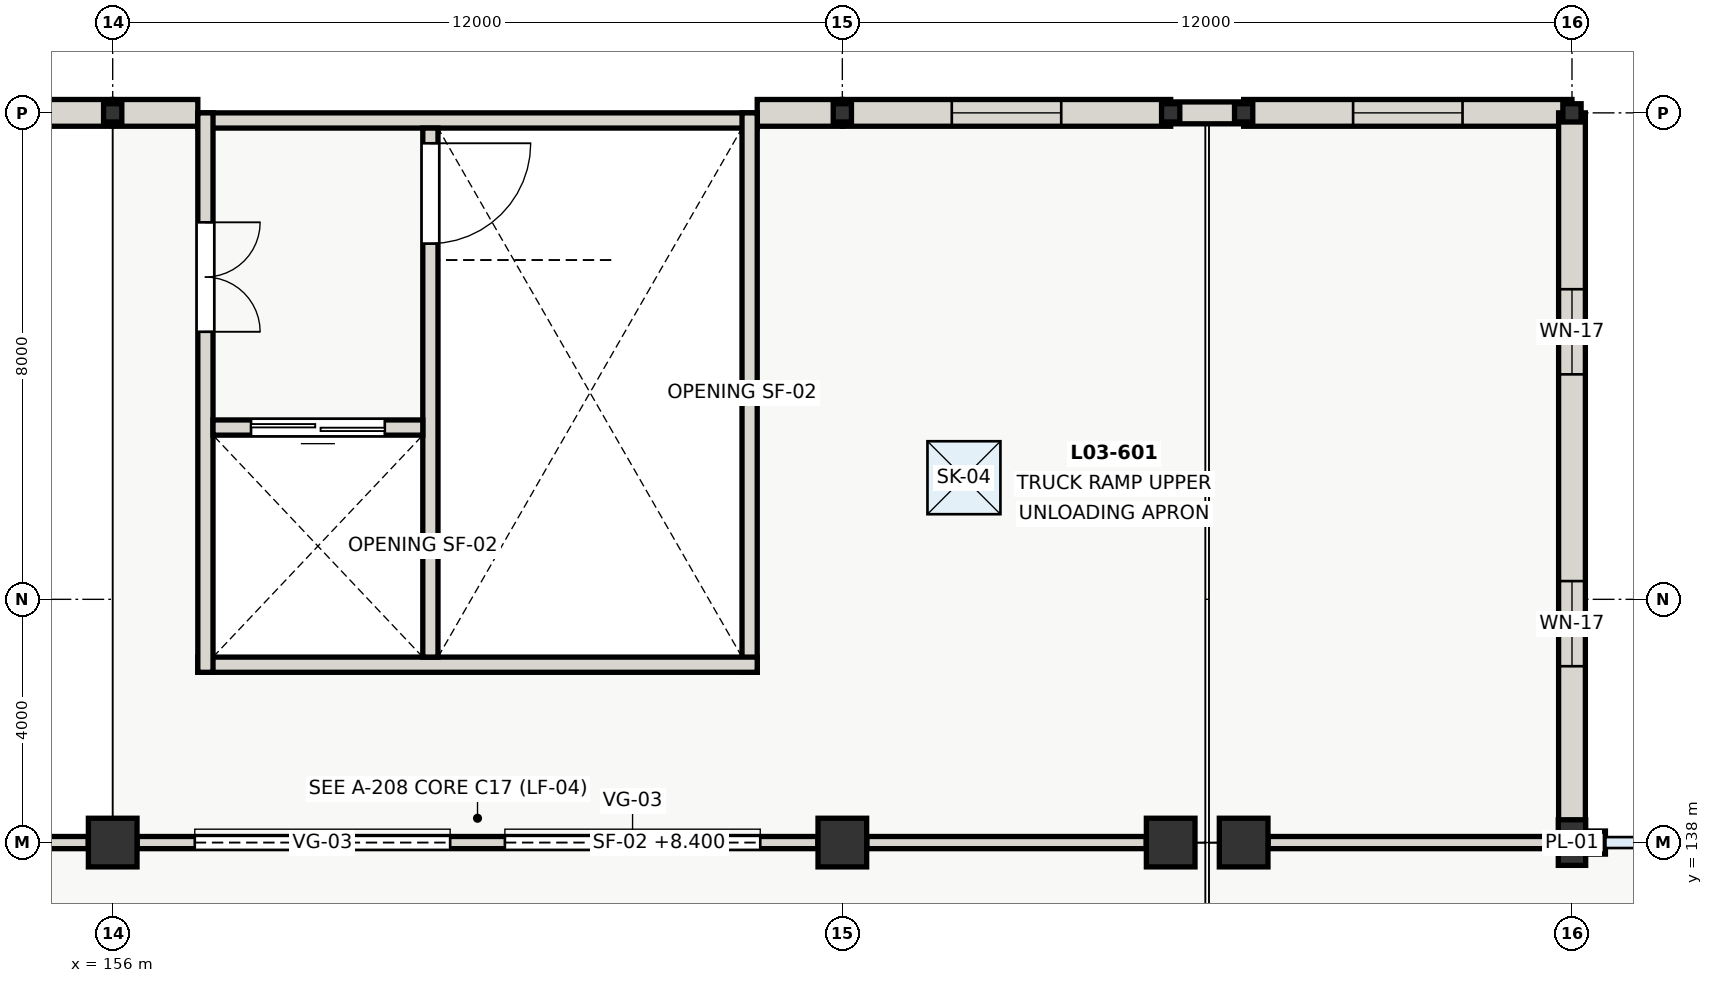
"""IFC4 building model, lengths in metres.
Left out: names, types, materials, properties, quantities, classifications, styles, units other than length and angle.
Written with IfcOpenShell. Run it as: python <this file> out.ifc"""

import sys

from ifc_helpers import new_model, si_unit, direction, frame, frame_2d, origin, origin_2d, place, context, subcontext, project, spatial, rectangle, i_section, extrude, element, fill, save


model = new_model("IFC4")
c1 = context("Model", 3, precision=1e-05, world=origin(), true_north=direction((0.0, 1.0)))
c2 = subcontext(c1, "Body", "Model", "MODEL_VIEW")
j1 = project(units=[si_unit("LENGTHUNIT", "METRE"), si_unit("PLANEANGLEUNIT", "RADIAN")], contexts=[c1])
p1 = place(None, origin())
s1 = spatial("IfcSite", under=j1, at=p1, CompositionType="ELEMENT")
p2 = place(p1, origin())
s2 = spatial("IfcBuilding", under=s1, at=p2, CompositionType="ELEMENT")
p3 = place(p2, frame((0.0, 0.0, 8.4)))
s3 = spatial("IfcBuildingStorey", under=s2, at=p3, CompositionType="ELEMENT", Elevation=8.4)
for number, where, z_axis, x_axis in (
    (1, (156.0, 138.0, 0.0), (0.0, 0.0, 1.0), (1.0, 0.0, 0.0)),
    (2, (168.0, 138.0, 0.0), (0.0, 0.0, 1.0), (1.0, 0.0, 0.0)),
    (3, (173.4, 138.0, 0.0), (0.0, 0.0, 1.0), (1.0, 0.0, 0.0)),
    (4, (174.6, 138.0, 0.0), (0.0, 0.0, 1.0), (1.0, 0.0, 0.0)),
):
    element("IfcColumn", number, at=place(p3, frame(where, z_axis=z_axis, x_axis=x_axis)), inside=s3, PredefinedType="COLUMN", context=c2, shape_type="SweptSolid", body=[
        extrude(rectangle(XDim=0.8, YDim=0.8, at=origin_2d()), origin(), (0.0, 0.0, 1.0), 4.2),
    ])
p4 = place(p3, frame((180.0, 138.0, 0.0), z_axis=(0.0, 0.0, 1.0), x_axis=(1.0, 0.0, 0.0)))
e5 = element("IfcColumn", 5, at=p4, inside=s3, PredefinedType="PILASTER", context=c2, shape_type="SweptSolid", body=[
    extrude(rectangle(XDim=0.45, YDim=0.75, at=origin_2d()), origin(), (0.0, 0.0, 1.0), 4.2),
])
for number, where, z_axis, x_axis in (
    (6, (156.0, 150.0, 0.0), (0.0, 0.0, 1.0), (1.0, 0.0, 0.0)),
    (7, (168.0, 150.0, 0.0), (0.0, 0.0, 1.0), (1.0, 0.0, 0.0)),
    (8, (173.4, 150.0, 0.0), (0.0, 0.0, 1.0), (1.0, 0.0, 0.0)),
    (9, (174.6, 150.0, 0.0), (0.0, 0.0, 1.0), (1.0, 0.0, 0.0)),
    (10, (180.0, 150.0, 0.0), (0.0, 0.0, 1.0), (1.0, 0.0, 0.0)),
):
    element("IfcColumn", number, at=place(p3, frame(where, z_axis=z_axis, x_axis=x_axis)), inside=s3, PredefinedType="COLUMN", context=c2, shape_type="SweptSolid", body=[
        extrude(i_section(OverallWidth=0.3, OverallDepth=0.3, WebThickness=0.011, FlangeThickness=0.019, at=origin_2d()), origin(), (0.0, 0.0, 1.0), 5.65),
    ])
p5 = place(p3, frame((180.222, 138.0, 0.0), z_axis=(0.0, 0.0, 1.0), x_axis=(1.0, 0.0, 0.0)))
e11 = element("IfcWall", 11, at=p5, inside=s3, PredefinedType="SOLIDWALL", context=c2, shape_type="SweptSolid", body=[
    extrude(rectangle(XDim=0.328, YDim=0.38, at=frame_2d((0.164, 0.0))), origin(), (0.0, 0.0, 1.0), 3.55),
])
p6 = place(p3, frame((144.0, 150.0, 0.0), z_axis=(0.0, 0.0, 1.0), x_axis=(1.0, 0.0, 0.0)))
e12 = element("IfcWall", 12, at=p6, inside=s3, PredefinedType="SHEAR", context=c2, shape_type="SweptSolid", body=[
    extrude(rectangle(XDim=12.0, YDim=0.44, at=frame_2d((6.0, 0.0))), origin(), (0.0, 0.0, 1.0), 5.65),
])
p7 = place(p6, frame((2.7, 0.0, 1.6)))
e13 = element("IfcOpeningElement", 13, at=p7, cuts=e12, PredefinedType="OPENING", context=c2, shape_type="SweptSolid", body=[
    extrude(rectangle(XDim=1.8, YDim=1.05, at=frame_2d((0.9, 0.525))), frame((0.0, 0.23, 0.0), z_axis=(0.0, -1.0, 0.0), x_axis=(1.0, 0.0, 0.0)), (0.0, 0.0, 1.0), 0.46),
])
p8 = place(p6, frame((7.5, 0.0, 1.6)))
e14 = element("IfcOpeningElement", 14, at=p8, cuts=e12, PredefinedType="OPENING", context=c2, shape_type="SweptSolid", body=[
    extrude(rectangle(XDim=1.8, YDim=1.05, at=frame_2d((0.9, 0.525))), frame((0.0, 0.23, 0.0), z_axis=(0.0, -1.0, 0.0), x_axis=(1.0, 0.0, 0.0)), (0.0, 0.0, 1.0), 0.46),
])
for number, where, z_axis, x_axis in (
    (15, (156.0, 150.0, 0.0), (0.0, 0.0, 1.0), (1.0, 0.0, 0.0)),
    (16, (166.6, 150.0, 0.0), (0.0, 0.0, 1.0), (1.0, 0.0, 0.0)),
):
    element("IfcWall", number, at=place(p3, frame(where, z_axis=z_axis, x_axis=x_axis)), inside=s3, PredefinedType="SHEAR", context=c2, shape_type="SweptSolid", body=[
        extrude(rectangle(XDim=1.4, YDim=0.44, at=frame_2d((0.7, 0.0))), origin(), (0.0, 0.0, 1.0), 5.65),
    ])
p9 = place(p3, frame((168.0, 150.0, 0.0), z_axis=(0.0, 0.0, 1.0), x_axis=(1.0, 0.0, 0.0)))
e17 = element("IfcWall", 17, at=p9, inside=s3, PredefinedType="SHEAR", context=c2, shape_type="SweptSolid", body=[
    extrude(rectangle(XDim=5.4, YDim=0.44, at=frame_2d((2.7, 0.0))), origin(), (0.0, 0.0, 1.0), 5.65),
])
p10 = place(p9, frame((1.8, 0.0, 1.6)))
e18 = element("IfcOpeningElement", 18, at=p10, cuts=e17, PredefinedType="OPENING", context=c2, shape_type="SweptSolid", body=[
    extrude(rectangle(XDim=1.8, YDim=1.05, at=frame_2d((0.9, 0.525))), frame((0.0, 0.23, 0.0), z_axis=(0.0, -1.0, 0.0), x_axis=(1.0, 0.0, 0.0)), (0.0, 0.0, 1.0), 0.46),
])
p11 = place(p3, frame((174.6, 150.0, 0.0), z_axis=(0.0, 0.0, 1.0), x_axis=(1.0, 0.0, 0.0)))
e19 = element("IfcWall", 19, at=p11, inside=s3, PredefinedType="SHEAR", context=c2, shape_type="SweptSolid", body=[
    extrude(rectangle(XDim=5.4, YDim=0.44, at=frame_2d((2.7, 0.0))), origin(), (0.0, 0.0, 1.0), 5.65),
])
p12 = place(p11, frame((1.8, 0.0, 1.6)))
e20 = element("IfcOpeningElement", 20, at=p12, cuts=e19, PredefinedType="OPENING", context=c2, shape_type="SweptSolid", body=[
    extrude(rectangle(XDim=1.8, YDim=1.05, at=frame_2d((0.9, 0.525))), frame((0.0, 0.23, 0.0), z_axis=(0.0, -1.0, 0.0), x_axis=(1.0, 0.0, 0.0)), (0.0, 0.0, 1.0), 0.46),
])
p13 = place(p3, frame((180.0, 150.0, 0.0), z_axis=(0.0, 0.0, 1.0), x_axis=(0.0, -1.0, 0.0)))
e21 = element("IfcWall", 21, at=p13, inside=s3, PredefinedType="SHEAR", context=c2, shape_type="SweptSolid", body=[
    extrude(rectangle(XDim=12.0, YDim=0.44, at=frame_2d((6.0, 0.0))), origin(), (0.0, 0.0, 1.0), 5.65),
])
p14 = place(p13, frame((2.9, 0.0, 1.5)))
e22 = element("IfcOpeningElement", 22, at=p14, cuts=e21, PredefinedType="OPENING", context=c2, shape_type="SweptSolid", body=[
    extrude(rectangle(XDim=1.4, YDim=0.95, at=frame_2d((0.7, 0.475))), frame((0.0, 0.23, 0.0), z_axis=(0.0, -1.0, 0.0), x_axis=(1.0, 0.0, 0.0)), (0.0, 0.0, 1.0), 0.46),
])
p15 = place(p13, frame((7.7, 0.0, 1.5)))
e23 = element("IfcOpeningElement", 23, at=p15, cuts=e21, PredefinedType="OPENING", context=c2, shape_type="SweptSolid", body=[
    extrude(rectangle(XDim=1.4, YDim=0.95, at=frame_2d((0.7, 0.475))), frame((0.0, 0.23, 0.0), z_axis=(0.0, -1.0, 0.0), x_axis=(1.0, 0.0, 0.0)), (0.0, 0.0, 1.0), 0.46),
])
p16 = place(p3, frame((173.4, 150.0, 0.0), z_axis=(0.0, 0.0, 1.0), x_axis=(1.0, 0.0, 0.0)))
e24 = element("IfcWall", 24, at=p16, inside=s3, PredefinedType="SOLIDWALL", context=c2, shape_type="SweptSolid", body=[
    extrude(rectangle(XDim=1.2, YDim=0.36, at=frame_2d((0.6, 0.0))), origin(), (0.0, 0.0, 1.0), 5.65),
])
p17 = place(p3, frame((157.4, 149.875, 0.0), z_axis=(0.0, 0.0, 1.0), x_axis=(1.0, 0.0, 0.0)))
e25 = element("IfcWall", 25, at=p17, inside=s3, PredefinedType="SHEAR", context=c2, shape_type="SweptSolid", body=[
    extrude(rectangle(XDim=9.2, YDim=0.25, at=frame_2d((4.6, 0.0))), origin(), (0.0, 0.0, 1.0), 5.6),
])
p18 = place(p3, frame((166.475, 150.0, 0.0), z_axis=(0.0, 0.0, 1.0), x_axis=(0.0, -1.0, 0.0)))
e26 = element("IfcWall", 26, at=p18, inside=s3, PredefinedType="SHEAR", context=c2, shape_type="SweptSolid", body=[
    extrude(rectangle(XDim=9.2, YDim=0.25, at=frame_2d((4.6, 0.0))), origin(), (0.0, 0.0, 1.0), 5.6),
])
p19 = place(p3, frame((166.6, 140.925, 0.0), z_axis=(0.0, 0.0, 1.0), x_axis=(-1.0, 0.0, 0.0)))
e27 = element("IfcWall", 27, at=p19, inside=s3, PredefinedType="SHEAR", context=c2, shape_type="SweptSolid", body=[
    extrude(rectangle(XDim=9.2, YDim=0.25, at=frame_2d((4.6, 0.0))), origin(), (0.0, 0.0, 1.0), 5.6),
])
p20 = place(p3, frame((157.525, 150.0, 0.0), z_axis=(0.0, 0.0, 1.0), x_axis=(0.0, -1.0, 0.0)))
e28 = element("IfcWall", 28, at=p20, inside=s3, PredefinedType="SHEAR", context=c2, shape_type="SweptSolid", body=[
    extrude(rectangle(XDim=9.2, YDim=0.25, at=frame_2d((4.6, 0.0))), origin(), (0.0, 0.0, 1.0), 5.6),
])
p21 = place(p20, frame((1.8, 0.0, 0.0)))
e29 = element("IfcOpeningElement", 29, at=p21, cuts=e28, PredefinedType="OPENING", context=c2, shape_type="SweptSolid", body=[
    extrude(rectangle(XDim=1.8, YDim=2.15, at=frame_2d((0.9, 1.075))), frame((0.0, 0.135, 0.0), z_axis=(0.0, -1.0, 0.0), x_axis=(1.0, 0.0, 0.0)), (0.0, 0.0, 1.0), 0.27),
])
p22 = place(p3, frame((161.225, 149.75, 0.0), z_axis=(0.0, 0.0, 1.0), x_axis=(0.0, -1.0, 0.0)))
e30 = element("IfcWall", 30, at=p22, inside=s3, PredefinedType="SHEAR", context=c2, shape_type="SweptSolid", body=[
    extrude(rectangle(XDim=8.7, YDim=0.25, at=frame_2d((4.35, 0.0))), origin(), (0.0, 0.0, 1.0), 5.6),
])
p23 = place(p22, frame((0.25, 0.0, 0.0)))
e31 = element("IfcOpeningElement", 31, at=p23, cuts=e30, PredefinedType="OPENING", context=c2, shape_type="SweptSolid", body=[
    extrude(rectangle(XDim=1.65, YDim=2.1, at=frame_2d((0.825, 1.05))), frame((0.0, 0.135, 0.0), z_axis=(0.0, -1.0, 0.0), x_axis=(1.0, 0.0, 0.0)), (0.0, 0.0, 1.0), 0.27),
])
p24 = place(p3, frame((161.1, 144.825, 0.0), z_axis=(0.0, 0.0, 1.0), x_axis=(-1.0, 0.0, 0.0)))
e32 = element("IfcWall", 32, at=p24, inside=s3, PredefinedType="SHEAR", context=c2, shape_type="SweptSolid", body=[
    extrude(rectangle(XDim=3.45, YDim=0.25, at=frame_2d((1.725, 0.0))), origin(), (0.0, 0.0, 1.0), 5.6),
])
p25 = place(p24, frame((0.625, 0.0, 0.0)))
e33 = element("IfcOpeningElement", 33, at=p25, cuts=e32, PredefinedType="OPENING", context=c2, shape_type="SweptSolid", body=[
    extrude(rectangle(XDim=2.2, YDim=2.35, at=frame_2d((1.1, 1.175))), frame((0.0, 0.135, 0.0), z_axis=(0.0, -1.0, 0.0), x_axis=(1.0, 0.0, 0.0)), (0.0, 0.0, 1.0), 0.27),
])
p26 = place(p2, origin())
s4 = spatial("IfcBuildingStorey", under=s2, at=p26, CompositionType="ELEMENT", Elevation=0.0)
for number, where, z_axis, x_axis in (
    (34, (126.05, 139.47, 0.0), (0.0, 0.0, 1.0), (1.0, 0.0, 0.0)),
    (35, (126.05, 148.53, 0.0), (0.0, 0.0, 1.0), (1.0, 0.0, 0.0)),
):
    element("IfcWall", number, at=place(p26, frame(where, z_axis=z_axis, x_axis=x_axis)), inside=s4, PredefinedType="SHEAR", context=c2, shape_type="SweptSolid", body=[
        extrude(rectangle(XDim=29.95, YDim=0.26, at=frame_2d((14.975, 0.0))), origin(), (0.0, 0.0, 1.0), 9.8),
    ])
p27 = place(p3, frame((144.402, 138.0, 0.0), z_axis=(0.0, 0.0, 1.0), x_axis=(1.0, 0.0, 0.0)))
e36 = element("IfcWall", 36, at=p27, inside=s3, PredefinedType="PARTITIONING", context=c2, shape_type="SweptSolid", body=[
    extrude(rectangle(XDim=11.196, YDim=0.2, at=frame_2d((5.598, 0.0))), origin(), (0.0, 0.0, 1.0), 3.57),
])
p28 = place(p3, frame((156.402, 138.0, 0.0), z_axis=(0.0, 0.0, 1.0), x_axis=(1.0, 0.0, 0.0)))
e37 = element("IfcWall", 37, at=p28, inside=s3, PredefinedType="PARTITIONING", context=c2, shape_type="SweptSolid", body=[
    extrude(rectangle(XDim=11.196, YDim=0.2, at=frame_2d((5.598, 0.0))), origin(), (0.0, 0.0, 1.0), 3.58),
])
p29 = place(p28, frame((0.948, 0.0, 0.0)))
e38 = element("IfcOpeningElement", 38, at=p29, cuts=e37, PredefinedType="OPENING", context=c2, shape_type="SweptSolid", body=[
    extrude(rectangle(XDim=4.2, YDim=3.5, at=frame_2d((2.1, 1.75))), frame((0.0, 0.11, 0.0), z_axis=(0.0, -1.0, 0.0), x_axis=(1.0, 0.0, 0.0)), (0.0, 0.0, 1.0), 0.22),
])
p30 = place(p28, frame((6.048, 0.0, 0.0)))
e39 = element("IfcOpeningElement", 39, at=p30, cuts=e37, PredefinedType="OPENING", context=c2, shape_type="SweptSolid", body=[
    extrude(rectangle(XDim=4.2, YDim=3.5, at=frame_2d((2.1, 1.75))), frame((0.0, 0.11, 0.0), z_axis=(0.0, -1.0, 0.0), x_axis=(1.0, 0.0, 0.0)), (0.0, 0.0, 1.0), 0.22),
])
p31 = place(p3, frame((168.402, 138.0, 0.0), z_axis=(0.0, 0.0, 1.0), x_axis=(1.0, 0.0, 0.0)))
e40 = element("IfcWall", 40, at=p31, inside=s3, PredefinedType="PARTITIONING", context=c2, shape_type="SweptSolid", body=[
    extrude(rectangle(XDim=4.596, YDim=0.2, at=frame_2d((2.298, 0.0))), origin(), (0.0, 0.0, 1.0), 3.58),
])
p32 = place(p3, frame((175.002, 138.0, 0.0), z_axis=(0.0, 0.0, 1.0), x_axis=(1.0, 0.0, 0.0)))
e41 = element("IfcWall", 41, at=p32, inside=s3, PredefinedType="PARTITIONING", context=c2, shape_type="SweptSolid", body=[
    extrude(rectangle(XDim=4.771, YDim=0.2, at=frame_2d((2.385, 0.0))), origin(), (0.0, 0.0, 1.0), 3.58),
])
p33 = place(p10, origin())
e42 = element("IfcWindow", 42, at=p33, inside=s3, PartitioningType="SINGLE_PANEL", PredefinedType="WINDOW", context=c2, shape_type="SweptSolid", body=[
    extrude(rectangle(XDim=1.8, YDim=1.05, at=frame_2d((0.9, 0.525))), frame((0.0, 0.03, 0.0), z_axis=(0.0, -1.0, 0.0), x_axis=(1.0, 0.0, 0.0)), (0.0, 0.0, 1.0), 0.06),
])
fill(e18, e42)
p34 = place(p12, origin())
e43 = element("IfcWindow", 43, at=p34, inside=s3, PartitioningType="SINGLE_PANEL", PredefinedType="WINDOW", context=c2, shape_type="SweptSolid", body=[
    extrude(rectangle(XDim=1.8, YDim=1.05, at=frame_2d((0.9, 0.525))), frame((0.0, 0.03, 0.0), z_axis=(0.0, -1.0, 0.0), x_axis=(1.0, 0.0, 0.0)), (0.0, 0.0, 1.0), 0.06),
])
fill(e20, e43)
p35 = place(p14, origin())
e44 = element("IfcWindow", 44, at=p35, inside=s3, PartitioningType="SINGLE_PANEL", PredefinedType="WINDOW", context=c2, shape_type="SweptSolid", body=[
    extrude(rectangle(XDim=1.4, YDim=0.95, at=frame_2d((0.7, 0.475))), frame((0.0, 0.03, 0.0), z_axis=(0.0, -1.0, 0.0), x_axis=(1.0, 0.0, 0.0)), (0.0, 0.0, 1.0), 0.06),
])
fill(e22, e44)
p36 = place(p15, origin())
e45 = element("IfcWindow", 45, at=p36, inside=s3, PartitioningType="SINGLE_PANEL", PredefinedType="WINDOW", context=c2, shape_type="SweptSolid", body=[
    extrude(rectangle(XDim=1.4, YDim=0.95, at=frame_2d((0.7, 0.475))), frame((0.0, 0.03, 0.0), z_axis=(0.0, -1.0, 0.0), x_axis=(1.0, 0.0, 0.0)), (0.0, 0.0, 1.0), 0.06),
])
fill(e23, e45)
p37 = place(p2, frame((0.0, 0.0, 21.0)))
p38 = place(p37, frame((0.0, 0.0, -6.95)))
p39 = place(p38, frame((170.0, 144.0, 0.0)))
p40 = place(p39, frame((0.0, 0.0, 0.29)))
e46 = element("IfcWindow", 46, at=p40, inside=s3, PartitioningType="SINGLE_PANEL", PredefinedType="SKYLIGHT", context=c2, shape_type="SweptSolid", body=[
    extrude(rectangle(XDim=1.2, YDim=1.2, at=origin_2d()), origin(), (0.0, 0.0, 1.0), 0.06),
])
p41 = place(p21, origin())
e47 = element("IfcDoor", 47, at=p41, inside=s3, OperationType="DOUBLE_DOOR_SINGLE_SWING", PredefinedType="DOOR", context=c2, shape_type="SweptSolid", body=[
    extrude(rectangle(XDim=1.8, YDim=2.15, at=frame_2d((0.9, 1.075))), frame((0.0, 0.025, 0.0), z_axis=(0.0, -1.0, 0.0), x_axis=(1.0, 0.0, 0.0)), (0.0, 0.0, 1.0), 0.05),
])
fill(e29, e47)
p42 = place(p23, origin())
e48 = element("IfcDoor", 48, at=p42, inside=s3, OperationType="SINGLE_SWING_LEFT", PredefinedType="DOOR", context=c2, shape_type="SweptSolid", body=[
    extrude(rectangle(XDim=1.65, YDim=2.1, at=frame_2d((0.825, 1.05))), frame((0.0, 0.025, 0.0), z_axis=(0.0, -1.0, 0.0), x_axis=(1.0, 0.0, 0.0)), (0.0, 0.0, 1.0), 0.05),
])
fill(e31, e48)
p43 = place(p25, origin())
e49 = element("IfcDoor", 49, at=p43, inside=s3, OperationType="SLIDING_TO_LEFT", PredefinedType="DOOR", context=c2, shape_type="SweptSolid", body=[
    extrude(rectangle(XDim=2.2, YDim=2.35, at=frame_2d((1.1, 1.175))), frame((0.0, 0.025, 0.0), z_axis=(0.0, -1.0, 0.0), x_axis=(1.0, 0.0, 0.0)), (0.0, 0.0, 1.0), 0.05),
])
fill(e33, e49)
p44 = place(p29, origin())
e50 = element("IfcDoor", 50, at=p44, inside=s3, OperationType="ROLLINGUP", PredefinedType="GATE", context=c2, shape_type="SweptSolid", body=[
    extrude(rectangle(XDim=4.2, YDim=3.5, at=frame_2d((2.1, 1.75))), frame((0.0, 0.025, 0.0), z_axis=(0.0, -1.0, 0.0), x_axis=(1.0, 0.0, 0.0)), (0.0, 0.0, 1.0), 0.05),
])
fill(e38, e50)
p45 = place(p30, origin())
e51 = element("IfcDoor", 51, at=p45, inside=s3, OperationType="ROLLINGUP", PredefinedType="GATE", context=c2, shape_type="SweptSolid", body=[
    extrude(rectangle(XDim=4.2, YDim=3.5, at=frame_2d((2.1, 1.75))), frame((0.0, 0.025, 0.0), z_axis=(0.0, -1.0, 0.0), x_axis=(1.0, 0.0, 0.0)), (0.0, 0.0, 1.0), 0.05),
])
fill(e39, e51)
save(model, sys.argv[1])
